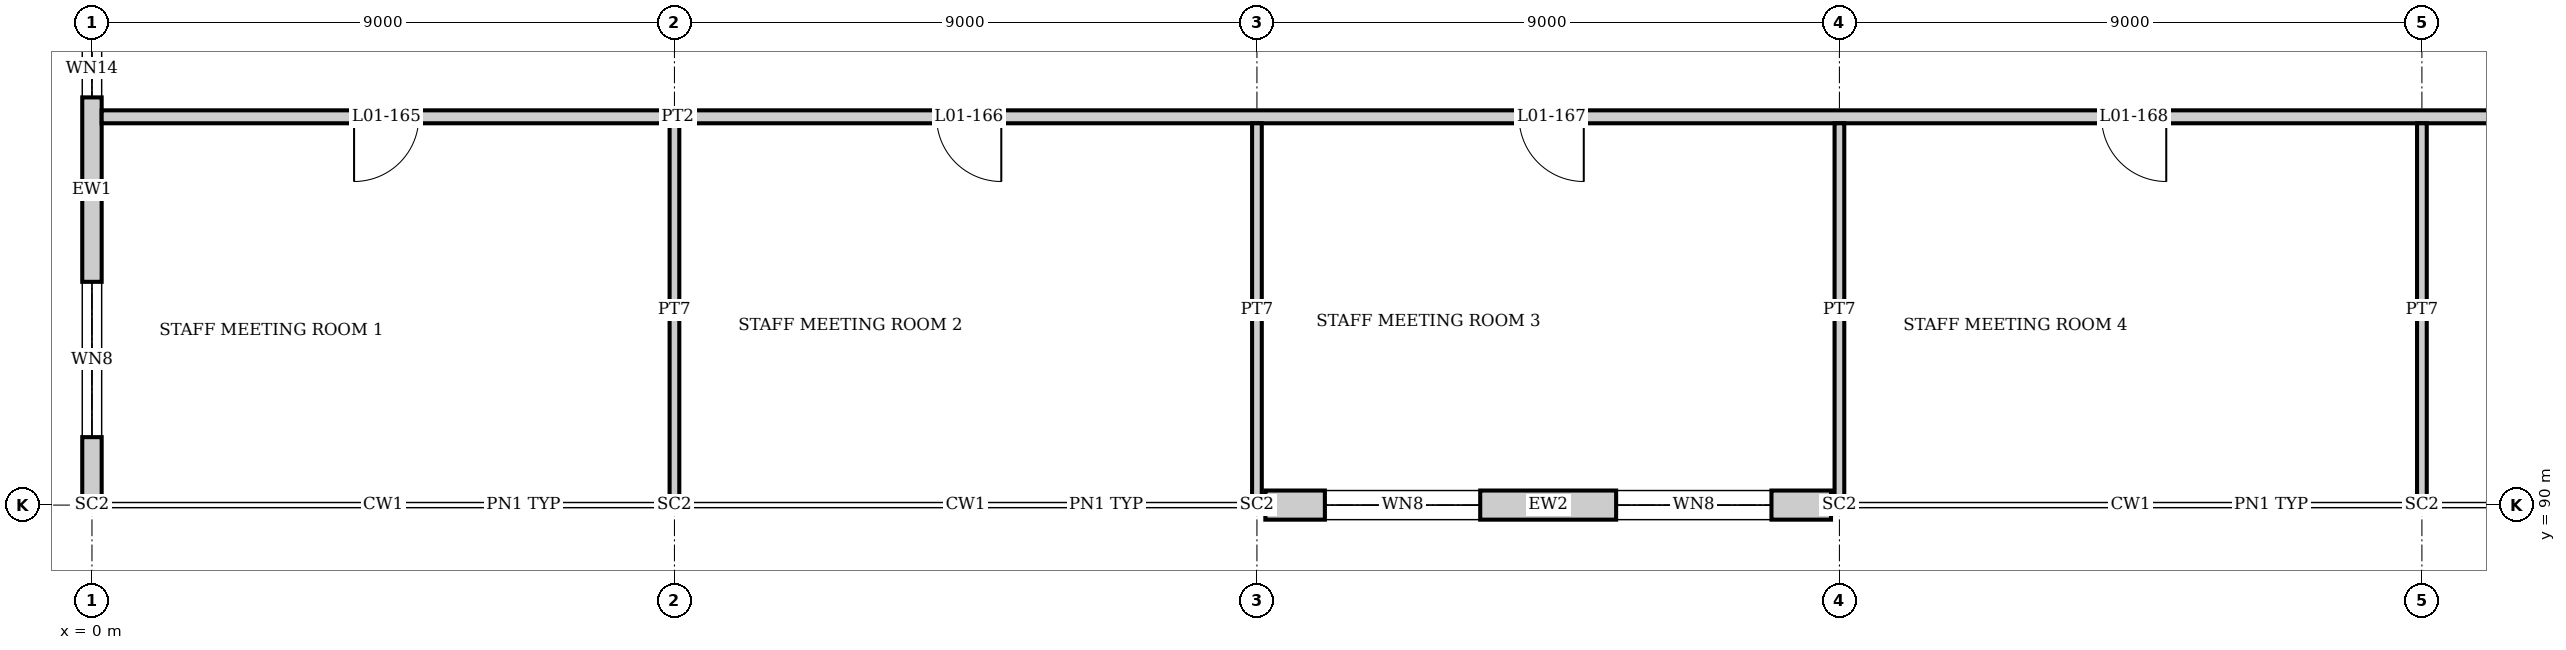
"""IFC4 building model, lengths in metres.
Left out: names, types, materials, properties, quantities, classifications, styles, units other than length and angle.
Written with IfcOpenShell. Run it as: python <this file> out.ifc"""

import sys

from ifc_helpers import new_model, si_unit, direction, frame, frame_2d, origin, origin_2d, place, context, subcontext, project, spatial, rectangle, i_section, extrude, element, fill, save


model = new_model("IFC4")
c1 = context("Model", 3, precision=1e-05, world=origin(), true_north=direction((0.0, 1.0)))
c2 = subcontext(c1, "Body", "Model", "MODEL_VIEW")
j1 = project(units=[si_unit("LENGTHUNIT", "METRE"), si_unit("PLANEANGLEUNIT", "RADIAN")], contexts=[c1])
p1 = place(None, origin())
s1 = spatial("IfcSite", under=j1, at=p1, CompositionType="ELEMENT")
p2 = place(p1, origin())
s2 = spatial("IfcBuilding", under=s1, at=p2, CompositionType="ELEMENT")
p3 = place(p2, frame((0.0, 0.0, 6.0)))
s3 = spatial("IfcBuildingStorey", under=s2, at=p3, CompositionType="ELEMENT", Elevation=6.0)
for number, where, z_axis, x_axis in (
    (1, (0.0, 90.0, 0.0), (0.0, 0.0, 1.0), (0.0, 1.0, 0.0)),
    (2, (9.0, 90.0, 0.0), (0.0, 0.0, 1.0), (0.0, 1.0, 0.0)),
    (3, (18.0, 90.0, 0.0), (0.0, 0.0, 1.0), (0.0, 1.0, 0.0)),
    (4, (27.0, 90.0, 0.0), (0.0, 0.0, 1.0), (0.0, 1.0, 0.0)),
    (5, (36.0, 90.0, 0.0), (0.0, 0.0, 1.0), (0.0, 1.0, 0.0)),
):
    element("IfcColumn", number, at=place(p3, frame(where, z_axis=z_axis, x_axis=x_axis)), inside=s3, PredefinedType="COLUMN", context=c2, shape_type="SweptSolid", body=[
        extrude(i_section(OverallWidth=0.256, OverallDepth=0.26, WebThickness=0.01, FlangeThickness=0.017, at=origin_2d()), origin(), (0.0, 0.0, 1.0), 4.5),
    ])
p4 = place(p3, frame((18.13, 90.0, 0.0), z_axis=(0.0, 0.0, 1.0), x_axis=(1.0, 0.0, 0.0)))
e6 = element("IfcWall", 6, at=p4, inside=s3, PredefinedType="SOLIDWALL", context=c2, shape_type="SweptSolid", body=[
    extrude(rectangle(XDim=8.74, YDim=0.45, at=frame_2d((4.37, 0.0))), origin(), (0.0, 0.0, 1.0), 3.991),
])
p5 = place(p4, frame((0.92, 0.0, 0.9)))
e7 = element("IfcOpeningElement", 7, at=p5, cuts=e6, PredefinedType="OPENING", context=c2, shape_type="SweptSolid", body=[
    extrude(rectangle(XDim=2.4, YDim=2.1, at=frame_2d((1.2, 1.05))), frame((0.0, 0.235, 0.0), z_axis=(0.0, -1.0, 0.0), x_axis=(1.0, 0.0, 0.0)), (0.0, 0.0, 1.0), 0.47),
])
p6 = place(p4, frame((5.42, 0.0, 0.9)))
e8 = element("IfcOpeningElement", 8, at=p6, cuts=e6, PredefinedType="OPENING", context=c2, shape_type="SweptSolid", body=[
    extrude(rectangle(XDim=2.4, YDim=2.1, at=frame_2d((1.2, 1.05))), frame((0.0, 0.235, 0.0), z_axis=(0.0, -1.0, 0.0), x_axis=(1.0, 0.0, 0.0)), (0.0, 0.0, 1.0), 0.47),
])
p7 = place(p3, frame((0.0, 90.128, 0.0), z_axis=(0.0, 0.0, 1.0), x_axis=(0.0, 1.0, 0.0)))
e9 = element("IfcWall", 9, at=p7, inside=s3, PredefinedType="SOLIDWALL", context=c2, shape_type="SweptSolid", body=[
    extrude(rectangle(XDim=8.872, YDim=0.3, at=frame_2d((4.436, 0.0))), origin(), (0.0, 0.0, 1.0), 3.947),
])
p8 = place(p7, frame((0.922, 0.0, 0.9)))
e10 = element("IfcOpeningElement", 10, at=p8, cuts=e9, PredefinedType="OPENING", context=c2, shape_type="SweptSolid", body=[
    extrude(rectangle(XDim=2.4, YDim=2.1, at=frame_2d((1.2, 1.05))), frame((0.0, 0.16, 0.0), z_axis=(0.0, -1.0, 0.0), x_axis=(1.0, 0.0, 0.0)), (0.0, 0.0, 1.0), 0.32),
])
p9 = place(p7, frame((6.172, 0.0, 0.6)))
e11 = element("IfcOpeningElement", 11, at=p9, cuts=e9, PredefinedType="OPENING", context=c2, shape_type="SweptSolid", body=[
    extrude(rectangle(XDim=0.9, YDim=2.7, at=frame_2d((0.45, 1.35))), frame((0.0, 0.16, 0.0), z_axis=(0.0, -1.0, 0.0), x_axis=(1.0, 0.0, 0.0)), (0.0, 0.0, 1.0), 0.32),
])
p10 = place(p3, frame((0.15, 96.0, 0.0), z_axis=(0.0, 0.0, 1.0), x_axis=(1.0, 0.0, 0.0)))
e12 = element("IfcWall", 12, at=p10, inside=s3, PredefinedType="PARTITIONING", context=c2, shape_type="SweptSolid", body=[
    extrude(rectangle(XDim=40.46, YDim=0.2, at=frame_2d((20.23, 0.0))), origin(), (0.0, 0.0, 1.0), 3.991),
])
p11 = place(p10, frame((3.9, 0.0, 0.0)))
e13 = element("IfcOpeningElement", 13, at=p11, cuts=e12, PredefinedType="OPENING", context=c2, shape_type="SweptSolid", body=[
    extrude(rectangle(XDim=1.0, YDim=2.1, at=frame_2d((0.5, 1.05))), frame((0.0, 0.11, 0.0), z_axis=(0.0, -1.0, 0.0), x_axis=(1.0, 0.0, 0.0)), (0.0, 0.0, 1.0), 0.22),
])
p12 = place(p10, frame((12.9, 0.0, 0.0)))
e14 = element("IfcOpeningElement", 14, at=p12, cuts=e12, PredefinedType="OPENING", context=c2, shape_type="SweptSolid", body=[
    extrude(rectangle(XDim=1.0, YDim=2.1, at=frame_2d((0.5, 1.05))), frame((0.0, 0.11, 0.0), z_axis=(0.0, -1.0, 0.0), x_axis=(1.0, 0.0, 0.0)), (0.0, 0.0, 1.0), 0.22),
])
p13 = place(p10, frame((21.9, 0.0, 0.0)))
e15 = element("IfcOpeningElement", 15, at=p13, cuts=e12, PredefinedType="OPENING", context=c2, shape_type="SweptSolid", body=[
    extrude(rectangle(XDim=1.0, YDim=2.1, at=frame_2d((0.5, 1.05))), frame((0.0, 0.11, 0.0), z_axis=(0.0, -1.0, 0.0), x_axis=(1.0, 0.0, 0.0)), (0.0, 0.0, 1.0), 0.22),
])
p14 = place(p10, frame((30.9, 0.0, 0.0)))
e16 = element("IfcOpeningElement", 16, at=p14, cuts=e12, PredefinedType="OPENING", context=c2, shape_type="SweptSolid", body=[
    extrude(rectangle(XDim=1.0, YDim=2.1, at=frame_2d((0.5, 1.05))), frame((0.0, 0.11, 0.0), z_axis=(0.0, -1.0, 0.0), x_axis=(1.0, 0.0, 0.0)), (0.0, 0.0, 1.0), 0.22),
])
p15 = place(p10, frame((37.65, 0.0, 0.0)))
e17 = element("IfcOpeningElement", 17, at=p15, cuts=e12, PredefinedType="OPENING", context=c2, shape_type="SweptSolid", body=[
    extrude(rectangle(XDim=0.92, YDim=2.1, at=frame_2d((0.46, 1.05))), frame((0.0, 0.11, 0.0), z_axis=(0.0, -1.0, 0.0), x_axis=(1.0, 0.0, 0.0)), (0.0, 0.0, 1.0), 0.22),
])
p16 = place(p3, frame((9.0, 90.13, 0.0), z_axis=(0.0, 0.0, 1.0), x_axis=(0.0, 1.0, 0.0)))
e18 = element("IfcWall", 18, at=p16, inside=s3, PredefinedType="PARTITIONING", context=c2, shape_type="SweptSolid", body=[
    extrude(rectangle(XDim=5.77, YDim=0.15, at=frame_2d((2.885, 0.0))), origin(), (0.0, 0.0, 1.0), 3.994),
])
for number, where, z_axis, x_axis in (
    (19, (18.0, 90.13, 0.0), (0.0, 0.0, 1.0), (0.0, 1.0, 0.0)),
    (20, (27.0, 90.13, 0.0), (0.0, 0.0, 1.0), (0.0, 1.0, 0.0)),
    (21, (36.0, 90.13, 0.0), (0.0, 0.0, 1.0), (0.0, 1.0, 0.0)),
):
    element("IfcWall", number, at=place(p3, frame(where, z_axis=z_axis, x_axis=x_axis)), inside=s3, PredefinedType="PARTITIONING", context=c2, shape_type="SweptSolid", body=[
        extrude(rectangle(XDim=5.77, YDim=0.15, at=frame_2d((2.885, 0.0))), origin(), (0.0, 0.0, 1.0), 3.991),
    ])
p17 = place(p5, origin())
e22 = element("IfcWindow", 22, at=p17, inside=s3, PartitioningType="SINGLE_PANEL", PredefinedType="WINDOW", context=c2, shape_type="SweptSolid", body=[
    extrude(rectangle(XDim=2.4, YDim=2.1, at=frame_2d((1.2, 1.05))), frame((0.0, 0.03, 0.0), z_axis=(0.0, -1.0, 0.0), x_axis=(1.0, 0.0, 0.0)), (0.0, 0.0, 1.0), 0.06),
])
fill(e7, e22)
p18 = place(p6, origin())
e23 = element("IfcWindow", 23, at=p18, inside=s3, PartitioningType="SINGLE_PANEL", PredefinedType="WINDOW", context=c2, shape_type="SweptSolid", body=[
    extrude(rectangle(XDim=2.4, YDim=2.1, at=frame_2d((1.2, 1.05))), frame((0.0, 0.03, 0.0), z_axis=(0.0, -1.0, 0.0), x_axis=(1.0, 0.0, 0.0)), (0.0, 0.0, 1.0), 0.06),
])
fill(e8, e23)
p19 = place(p8, origin())
e24 = element("IfcWindow", 24, at=p19, inside=s3, PartitioningType="SINGLE_PANEL", PredefinedType="WINDOW", context=c2, shape_type="SweptSolid", body=[
    extrude(rectangle(XDim=2.4, YDim=2.1, at=frame_2d((1.2, 1.05))), frame((0.0, 0.03, 0.0), z_axis=(0.0, -1.0, 0.0), x_axis=(1.0, 0.0, 0.0)), (0.0, 0.0, 1.0), 0.06),
])
fill(e10, e24)
p20 = place(p9, origin())
e25 = element("IfcWindow", 25, at=p20, inside=s3, PartitioningType="SINGLE_PANEL", PredefinedType="WINDOW", context=c2, shape_type="SweptSolid", body=[
    extrude(rectangle(XDim=0.9, YDim=2.7, at=frame_2d((0.45, 1.35))), frame((0.0, 0.03, 0.0), z_axis=(0.0, -1.0, 0.0), x_axis=(1.0, 0.0, 0.0)), (0.0, 0.0, 1.0), 0.06),
])
fill(e11, e25)
p21 = place(p11, frame((1.0, 0.0, 0.0), z_axis=(0.0, 0.0, 1.0), x_axis=(-1.0, 0.0, 0.0)))
e26 = element("IfcDoor", 26, at=p21, inside=s3, OperationType="SINGLE_SWING_RIGHT", PredefinedType="DOOR", context=c2, shape_type="SweptSolid", body=[
    extrude(rectangle(XDim=1.0, YDim=2.1, at=frame_2d((0.5, 1.05))), frame((0.0, 0.025, 0.0), z_axis=(0.0, -1.0, 0.0), x_axis=(1.0, 0.0, 0.0)), (0.0, 0.0, 1.0), 0.05),
])
fill(e13, e26)
p22 = place(p12, frame((1.0, 0.0, 0.0), z_axis=(0.0, 0.0, 1.0), x_axis=(-1.0, 0.0, 0.0)))
e27 = element("IfcDoor", 27, at=p22, inside=s3, OperationType="SINGLE_SWING_LEFT", PredefinedType="DOOR", context=c2, shape_type="SweptSolid", body=[
    extrude(rectangle(XDim=1.0, YDim=2.1, at=frame_2d((0.5, 1.05))), frame((0.0, 0.025, 0.0), z_axis=(0.0, -1.0, 0.0), x_axis=(1.0, 0.0, 0.0)), (0.0, 0.0, 1.0), 0.05),
])
fill(e14, e27)
p23 = place(p13, frame((1.0, 0.0, 0.0), z_axis=(0.0, 0.0, 1.0), x_axis=(-1.0, 0.0, 0.0)))
e28 = element("IfcDoor", 28, at=p23, inside=s3, OperationType="SINGLE_SWING_LEFT", PredefinedType="DOOR", context=c2, shape_type="SweptSolid", body=[
    extrude(rectangle(XDim=1.0, YDim=2.1, at=frame_2d((0.5, 1.05))), frame((0.0, 0.025, 0.0), z_axis=(0.0, -1.0, 0.0), x_axis=(1.0, 0.0, 0.0)), (0.0, 0.0, 1.0), 0.05),
])
fill(e15, e28)
p24 = place(p14, frame((1.0, 0.0, 0.0), z_axis=(0.0, 0.0, 1.0), x_axis=(-1.0, 0.0, 0.0)))
e29 = element("IfcDoor", 29, at=p24, inside=s3, OperationType="SINGLE_SWING_LEFT", PredefinedType="DOOR", context=c2, shape_type="SweptSolid", body=[
    extrude(rectangle(XDim=1.0, YDim=2.1, at=frame_2d((0.5, 1.05))), frame((0.0, 0.025, 0.0), z_axis=(0.0, -1.0, 0.0), x_axis=(1.0, 0.0, 0.0)), (0.0, 0.0, 1.0), 0.05),
])
fill(e16, e29)
save(model, sys.argv[1])
